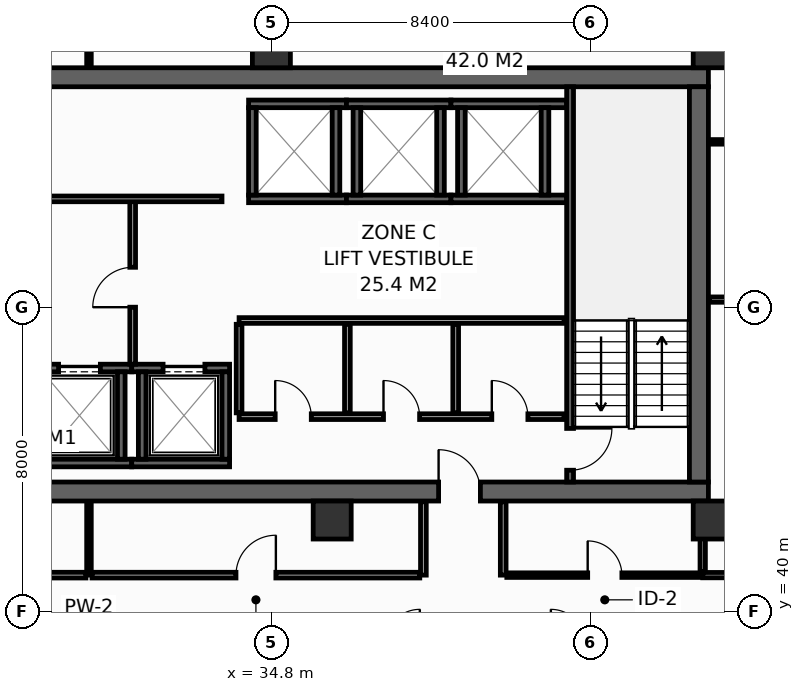
"""IFC4 building model, lengths in metres.
Left out: names, types, materials, properties, quantities, classifications, styles, units other than length and angle.
Written with IfcOpenShell. Run it as: python <this file> out.ifc"""

import sys

from ifc_helpers import new_model, si_unit, direction, frame, frame_2d, origin, origin_2d, place, context, subcontext, project, spatial, rectangle, hollow_rectangle, extrude, element, fill, save


model = new_model("IFC4")
c1 = context("Model", 3, precision=1e-05, world=origin(), true_north=direction((0.0, 1.0)))
c2 = subcontext(c1, "Body", "Model", "MODEL_VIEW")
j1 = project(units=[si_unit("LENGTHUNIT", "METRE"), si_unit("PLANEANGLEUNIT", "RADIAN")], contexts=[c1])
p1 = place(None, origin())
s1 = spatial("IfcSite", under=j1, at=p1, CompositionType="ELEMENT")
p2 = place(p1, origin())
s2 = spatial("IfcBuilding", under=s1, at=p2, CompositionType="ELEMENT")
p3 = place(p2, frame((0.0, 0.0, 144.8)))
s3 = spatial("IfcBuildingStorey", under=s2, at=p3, CompositionType="ELEMENT", Elevation=144.8)
p4 = place(p3, frame((13.6, 43.15, 0.0), z_axis=(0.0, 0.0, 1.0), x_axis=(1.0, 0.0, 0.0)))
e1 = element("IfcWall", 1, at=p4, inside=s3, PredefinedType="SHEAR", context=c2, shape_type="SweptSolid", body=[
    extrude(rectangle(XDim=32.7, YDim=0.5, at=frame_2d((16.35, 0.0))), origin(), (0.0, 0.0, 1.0), 3.55),
])
p5 = place(p4, frame((5.4, 0.0, 0.0)))
e2 = element("IfcOpeningElement", 2, at=p5, cuts=e1, PredefinedType="OPENING", context=c2, shape_type="SweptSolid", body=[
    extrude(rectangle(XDim=1.1, YDim=2.15, at=frame_2d((0.55, 1.075))), frame((0.0, 0.26, 0.0), z_axis=(0.0, -1.0, 0.0), x_axis=(1.0, 0.0, 0.0)), (0.0, 0.0, 1.0), 0.52),
])
p6 = place(p4, frame((25.6, 0.0, 0.0)))
e3 = element("IfcOpeningElement", 3, at=p6, cuts=e1, PredefinedType="OPENING", context=c2, shape_type="SweptSolid", body=[
    extrude(rectangle(XDim=1.1, YDim=2.15, at=frame_2d((0.55, 1.075))), frame((0.0, 0.26, 0.0), z_axis=(0.0, -1.0, 0.0), x_axis=(1.0, 0.0, 0.0)), (0.0, 0.0, 1.0), 0.52),
])
p7 = place(p3, frame((13.6, 54.05, 0.0), z_axis=(0.0, 0.0, 1.0), x_axis=(1.0, 0.0, 0.0)))
e4 = element("IfcWall", 4, at=p7, inside=s3, PredefinedType="SHEAR", context=c2, shape_type="SweptSolid", body=[
    extrude(rectangle(XDim=32.7, YDim=0.5, at=frame_2d((16.35, 0.0))), origin(), (0.0, 0.0, 1.0), 3.55),
])
p8 = place(p3, frame((46.05, 43.4, 0.0), z_axis=(0.0, 0.0, 1.0), x_axis=(0.0, 1.0, 0.0)))
e5 = element("IfcWall", 5, at=p8, inside=s3, PredefinedType="SHEAR", context=c2, shape_type="SweptSolid", body=[
    extrude(rectangle(XDim=10.4, YDim=0.5, at=frame_2d((5.2, 0.0))), origin(), (0.0, 0.0, 1.0), 3.55),
])
for number, where, z_axis, x_axis in (
    (6, (34.8, 54.8, 0.0), (0.0, 0.0, 1.0), (1.0, 0.0, 0.0)),
    (7, (46.4, 54.8, 0.0), (0.0, 0.0, 1.0), (1.0, 0.0, 0.0)),
    (8, (36.4, 42.4, 0.0), (0.0, 0.0, 1.0), (1.0, 0.0, 0.0)),
    (9, (46.4, 42.4, 0.0), (0.0, 0.0, 1.0), (1.0, 0.0, 0.0)),
):
    element("IfcColumn", number, at=place(p3, frame(where, z_axis=z_axis, x_axis=x_axis)), inside=s3, PredefinedType="COLUMN", context=c2, shape_type="SweptSolid", body=[
        extrude(hollow_rectangle(XDim=1.0, YDim=1.0, WallThickness=0.045, at=origin_2d()), origin(), (0.0, 0.0, 1.0), 3.8),
    ])
p9 = place(p3, frame((28.375, 43.9, 0.0), z_axis=(0.0, 0.0, 1.0), x_axis=(1.0, 0.0, 0.0)))
e10 = element("IfcWall", 10, at=p9, inside=s3, PredefinedType="SHEAR", context=c2, shape_type="SweptSolid", body=[
    extrude(rectangle(XDim=2.75, YDim=0.2, at=frame_2d((1.375, 0.0))), origin(), (0.0, 0.0, 1.0), 3.55),
])
p10 = place(p3, frame((28.375, 46.4, 0.0), z_axis=(0.0, 0.0, 1.0), x_axis=(1.0, 0.0, 0.0)))
e11 = element("IfcWall", 11, at=p10, inside=s3, PredefinedType="SHEAR", context=c2, shape_type="SweptSolid", body=[
    extrude(rectangle(XDim=2.75, YDim=0.2, at=frame_2d((1.375, 0.0))), origin(), (0.0, 0.0, 1.0), 3.55),
])
p11 = place(p10, frame((0.825, 0.0, 0.0)))
e12 = element("IfcOpeningElement", 12, at=p11, cuts=e11, PredefinedType="OPENING", context=c2, shape_type="SweptSolid", body=[
    extrude(rectangle(XDim=1.1, YDim=2.2, at=frame_2d((0.55, 1.1))), frame((0.0, 0.11, 0.0), z_axis=(0.0, -1.0, 0.0), x_axis=(1.0, 0.0, 0.0)), (0.0, 0.0, 1.0), 0.22),
])
p12 = place(p3, frame((30.85, 44.0, 0.0), z_axis=(0.0, 0.0, 1.0), x_axis=(0.0, 1.0, 0.0)))
e13 = element("IfcWall", 13, at=p12, inside=s3, PredefinedType="SHEAR", context=c2, shape_type="SweptSolid", body=[
    extrude(rectangle(XDim=2.3, YDim=0.2, at=frame_2d((1.15, 0.0))), origin(), (0.0, 0.0, 1.0), 3.55),
])
p13 = place(p3, frame((31.125, 43.9, 0.0), z_axis=(0.0, 0.0, 1.0), x_axis=(1.0, 0.0, 0.0)))
e14 = element("IfcWall", 14, at=p13, inside=s3, PredefinedType="SHEAR", context=c2, shape_type="SweptSolid", body=[
    extrude(rectangle(XDim=2.575, YDim=0.2, at=frame_2d((1.288, 0.0))), origin(), (0.0, 0.0, 1.0), 3.55),
])
p14 = place(p3, frame((31.125, 46.4, 0.0), z_axis=(0.0, 0.0, 1.0), x_axis=(1.0, 0.0, 0.0)))
e15 = element("IfcWall", 15, at=p14, inside=s3, PredefinedType="SHEAR", context=c2, shape_type="SweptSolid", body=[
    extrude(rectangle(XDim=2.575, YDim=0.2, at=frame_2d((1.288, 0.0))), origin(), (0.0, 0.0, 1.0), 3.55),
])
p15 = place(p14, frame((0.825, 0.0, 0.0)))
e16 = element("IfcOpeningElement", 16, at=p15, cuts=e15, PredefinedType="OPENING", context=c2, shape_type="SweptSolid", body=[
    extrude(rectangle(XDim=1.1, YDim=2.2, at=frame_2d((0.55, 1.1))), frame((0.0, 0.11, 0.0), z_axis=(0.0, -1.0, 0.0), x_axis=(1.0, 0.0, 0.0)), (0.0, 0.0, 1.0), 0.22),
])
for number, where, z_axis, x_axis in (
    (17, (31.4, 44.0, 0.0), (0.0, 0.0, 1.0), (0.0, 1.0, 0.0)),
    (18, (33.6, 44.0, 0.0), (0.0, 0.0, 1.0), (0.0, 1.0, 0.0)),
):
    element("IfcWall", number, at=place(p3, frame(where, z_axis=z_axis, x_axis=x_axis)), inside=s3, PredefinedType="SHEAR", context=c2, shape_type="SweptSolid", body=[
        extrude(rectangle(XDim=2.3, YDim=0.2, at=frame_2d((1.15, 0.0))), origin(), (0.0, 0.0, 1.0), 3.55),
    ])
for number, where, z_axis, x_axis in (
    (19, (34.2, 50.85, 0.0), (0.0, 0.0, 1.0), (1.0, 0.0, 0.0)),
    (20, (34.2, 53.35, 0.0), (0.0, 0.0, 1.0), (1.0, 0.0, 0.0)),
):
    element("IfcWall", number, at=place(p3, frame(where, z_axis=z_axis, x_axis=x_axis)), inside=s3, PredefinedType="SHEAR", context=c2, shape_type="SweptSolid", body=[
        extrude(rectangle(XDim=2.575, YDim=0.2, at=frame_2d((1.288, 0.0))), origin(), (0.0, 0.0, 1.0), 3.55),
    ])
for number, where, z_axis, x_axis in (
    (21, (34.3, 50.95, 0.0), (0.0, 0.0, 1.0), (0.0, 1.0, 0.0)),
    (22, (36.5, 50.95, 0.0), (0.0, 0.0, 1.0), (0.0, 1.0, 0.0)),
):
    element("IfcWall", number, at=place(p3, frame(where, z_axis=z_axis, x_axis=x_axis)), inside=s3, PredefinedType="SHEAR", context=c2, shape_type="SweptSolid", body=[
        extrude(rectangle(XDim=2.3, YDim=0.2, at=frame_2d((1.15, 0.0))), origin(), (0.0, 0.0, 1.0), 3.55),
    ])
for number, where, z_axis, x_axis in (
    (23, (36.775, 50.85, 0.0), (0.0, 0.0, 1.0), (1.0, 0.0, 0.0)),
    (24, (36.775, 53.35, 0.0), (0.0, 0.0, 1.0), (1.0, 0.0, 0.0)),
):
    element("IfcWall", number, at=place(p3, frame(where, z_axis=z_axis, x_axis=x_axis)), inside=s3, PredefinedType="SHEAR", context=c2, shape_type="SweptSolid", body=[
        extrude(rectangle(XDim=2.75, YDim=0.2, at=frame_2d((1.375, 0.0))), origin(), (0.0, 0.0, 1.0), 3.55),
    ])
for number, where, z_axis, x_axis in (
    (25, (37.05, 50.95, 0.0), (0.0, 0.0, 1.0), (0.0, 1.0, 0.0)),
    (26, (39.25, 50.95, 0.0), (0.0, 0.0, 1.0), (0.0, 1.0, 0.0)),
):
    element("IfcWall", number, at=place(p3, frame(where, z_axis=z_axis, x_axis=x_axis)), inside=s3, PredefinedType="SHEAR", context=c2, shape_type="SweptSolid", body=[
        extrude(rectangle(XDim=2.3, YDim=0.2, at=frame_2d((1.15, 0.0))), origin(), (0.0, 0.0, 1.0), 3.55),
    ])
for number, where, z_axis, x_axis in (
    (27, (39.525, 50.85, 0.0), (0.0, 0.0, 1.0), (1.0, 0.0, 0.0)),
    (28, (39.525, 53.35, 0.0), (0.0, 0.0, 1.0), (1.0, 0.0, 0.0)),
):
    element("IfcWall", number, at=place(p3, frame(where, z_axis=z_axis, x_axis=x_axis)), inside=s3, PredefinedType="SHEAR", context=c2, shape_type="SweptSolid", body=[
        extrude(rectangle(XDim=3.045, YDim=0.2, at=frame_2d((1.522, 0.0))), origin(), (0.0, 0.0, 1.0), 3.55),
    ])
for number, where, z_axis, x_axis in (
    (29, (39.8, 50.95, 0.0), (0.0, 0.0, 1.0), (0.0, 1.0, 0.0)),
    (30, (42.0, 50.95, 0.0), (0.0, 0.0, 1.0), (0.0, 1.0, 0.0)),
):
    element("IfcWall", number, at=place(p3, frame(where, z_axis=z_axis, x_axis=x_axis)), inside=s3, PredefinedType="SHEAR", context=c2, shape_type="SweptSolid", body=[
        extrude(rectangle(XDim=2.3, YDim=0.2, at=frame_2d((1.15, 0.0))), origin(), (0.0, 0.0, 1.0), 3.55),
    ])
p16 = place(p3, frame((42.66, 53.8, 0.0), z_axis=(0.0, 0.0, 1.0), x_axis=(0.0, -1.0, 0.0)))
e31 = element("IfcWall", 31, at=p16, inside=s3, PredefinedType="SHEAR", context=c2, shape_type="SweptSolid", body=[
    extrude(rectangle(XDim=10.4, YDim=0.18, at=frame_2d((5.2, 0.0))), origin(), (0.0, 0.0, 1.0), 3.55),
])
p17 = place(p16, frame((8.99, 0.0, 0.0)))
e32 = element("IfcOpeningElement", 32, at=p17, cuts=e31, PredefinedType="OPENING", context=c2, shape_type="SweptSolid", body=[
    extrude(rectangle(XDim=1.1, YDim=2.15, at=frame_2d((0.55, 1.075))), frame((0.0, 0.1, 0.0), z_axis=(0.0, -1.0, 0.0), x_axis=(1.0, 0.0, 0.0)), (0.0, 0.0, 1.0), 0.2),
])
p18 = place(p3, frame((31.15, 46.5, 0.0), z_axis=(0.0, 0.0, 1.0), x_axis=(0.0, 1.0, 0.0)))
e33 = element("IfcWall", 33, at=p18, inside=s3, PredefinedType="PARTITIONING", context=c2, shape_type="SweptSolid", body=[
    extrude(rectangle(XDim=4.35, YDim=0.15, at=frame_2d((2.175, 0.0))), origin(), (0.0, 0.0, 1.0), 3.55),
])
p19 = place(p18, frame((1.5, 0.0, 0.0)))
e34 = element("IfcOpeningElement", 34, at=p19, cuts=e33, PredefinedType="OPENING", context=c2, shape_type="SweptSolid", body=[
    extrude(rectangle(XDim=1.05, YDim=2.15, at=frame_2d((0.525, 1.075))), frame((0.0, 0.085, 0.0), z_axis=(0.0, -1.0, 0.0), x_axis=(1.0, 0.0, 0.0)), (0.0, 0.0, 1.0), 0.17),
])
p20 = place(p3, frame((33.95, 45.12, 0.0), z_axis=(0.0, 0.0, 1.0), x_axis=(1.0, 0.0, 0.0)))
e35 = element("IfcWall", 35, at=p20, inside=s3, PredefinedType="PARTITIONING", context=c2, shape_type="SweptSolid", body=[
    extrude(rectangle(XDim=8.55, YDim=0.15, at=frame_2d((4.275, 0.0))), origin(), (0.0, 0.0, 1.0), 3.55),
])
p21 = place(p20, frame((0.95, 0.0, 0.0)))
e36 = element("IfcOpeningElement", 36, at=p21, cuts=e35, PredefinedType="OPENING", context=c2, shape_type="SweptSolid", body=[
    extrude(rectangle(XDim=0.95, YDim=2.15, at=frame_2d((0.475, 1.075))), frame((0.0, 0.085, 0.0), z_axis=(0.0, -1.0, 0.0), x_axis=(1.0, 0.0, 0.0)), (0.0, 0.0, 1.0), 0.17),
])
p22 = place(p20, frame((3.8, 0.0, 0.0)))
e37 = element("IfcOpeningElement", 37, at=p22, cuts=e35, PredefinedType="OPENING", context=c2, shape_type="SweptSolid", body=[
    extrude(rectangle(XDim=0.95, YDim=2.15, at=frame_2d((0.475, 1.075))), frame((0.0, 0.085, 0.0), z_axis=(0.0, -1.0, 0.0), x_axis=(1.0, 0.0, 0.0)), (0.0, 0.0, 1.0), 0.17),
])
p23 = place(p20, frame((6.65, 0.0, 0.0)))
e38 = element("IfcOpeningElement", 38, at=p23, cuts=e35, PredefinedType="OPENING", context=c2, shape_type="SweptSolid", body=[
    extrude(rectangle(XDim=0.95, YDim=2.15, at=frame_2d((0.475, 1.075))), frame((0.0, 0.085, 0.0), z_axis=(0.0, -1.0, 0.0), x_axis=(1.0, 0.0, 0.0)), (0.0, 0.0, 1.0), 0.17),
])
p24 = place(p3, frame((33.95, 47.65, 0.0), z_axis=(0.0, 0.0, 1.0), x_axis=(1.0, 0.0, 0.0)))
e39 = element("IfcWall", 39, at=p24, inside=s3, PredefinedType="PARTITIONING", context=c2, shape_type="SweptSolid", body=[
    extrude(rectangle(XDim=8.55, YDim=0.15, at=frame_2d((4.275, 0.0))), origin(), (0.0, 0.0, 1.0), 3.55),
])
for number, where, z_axis, x_axis in (
    (40, (33.95, 45.22, 0.0), (0.0, 0.0, 1.0), (0.0, 1.0, 0.0)),
    (41, (36.8, 45.22, 0.0), (0.0, 0.0, 1.0), (0.0, 1.0, 0.0)),
    (42, (39.65, 45.22, 0.0), (0.0, 0.0, 1.0), (0.0, 1.0, 0.0)),
):
    element("IfcWall", number, at=place(p3, frame(where, z_axis=z_axis, x_axis=x_axis)), inside=s3, PredefinedType="PARTITIONING", context=c2, shape_type="SweptSolid", body=[
        extrude(rectangle(XDim=2.33, YDim=0.15, at=frame_2d((1.165, 0.0))), origin(), (0.0, 0.0, 1.0), 3.55),
    ])
p25 = place(p3, frame((25.85, 50.85, 0.0), z_axis=(0.0, 0.0, 1.0), x_axis=(1.0, 0.0, 0.0)))
e43 = element("IfcWall", 43, at=p25, inside=s3, PredefinedType="PARTITIONING", context=c2, shape_type="SweptSolid", body=[
    extrude(rectangle(XDim=7.65, YDim=0.15, at=frame_2d((3.825, 0.0))), origin(), (0.0, 0.0, 1.0), 3.55),
])
p26 = place(p25, frame((1.25, 0.0, 0.0)))
e44 = element("IfcOpeningElement", 44, at=p26, cuts=e43, PredefinedType="OPENING", context=c2, shape_type="SweptSolid", body=[
    extrude(rectangle(XDim=0.95, YDim=2.15, at=frame_2d((0.475, 1.075))), frame((0.0, 0.085, 0.0), z_axis=(0.0, -1.0, 0.0), x_axis=(1.0, 0.0, 0.0)), (0.0, 0.0, 1.0), 0.17),
])
p27 = place(p3, frame((46.15, 40.95, 0.0), z_axis=(0.0, 0.0, 1.0), x_axis=(1.0, 0.0, 0.0)))
e45 = element("IfcWall", 45, at=p27, inside=s3, PredefinedType="PARTITIONING", context=c2, shape_type="SweptSolid", body=[
    extrude(rectangle(XDim=4.05, YDim=0.14, at=frame_2d((2.025, 0.0))), origin(), (0.0, 0.0, 1.0), 3.55),
])
p28 = place(p3, frame((46.15, 41.04, 0.0), z_axis=(0.0, 0.0, 1.0), x_axis=(0.0, 1.0, 0.0)))
e46 = element("IfcWall", 46, at=p28, inside=s3, PredefinedType="PARTITIONING", context=c2, shape_type="SweptSolid", body=[
    extrude(rectangle(XDim=1.84, YDim=0.14, at=frame_2d((0.92, 0.0))), origin(), (0.0, 0.0, 1.0), 3.55),
])
p29 = place(p3, frame((46.32, 48.2, 0.0), z_axis=(0.0, 0.0, 1.0), x_axis=(1.0, 0.0, 0.0)))
e47 = element("IfcWall", 47, at=p29, inside=s3, PredefinedType="PARTITIONING", context=c2, shape_type="SweptSolid", body=[
    extrude(rectangle(XDim=3.88, YDim=0.14, at=frame_2d((1.94, 0.0))), origin(), (0.0, 0.0, 1.0), 3.55),
])
p30 = place(p3, frame((46.32, 52.35, 0.0), z_axis=(0.0, 0.0, 1.0), x_axis=(1.0, 0.0, 0.0)))
e48 = element("IfcWall", 48, at=p30, inside=s3, PredefinedType="PARTITIONING", context=c2, shape_type="SweptSolid", body=[
    extrude(rectangle(XDim=3.88, YDim=0.12, at=frame_2d((1.94, 0.0))), origin(), (0.0, 0.0, 1.0), 3.55),
])
p31 = place(p3, frame((30.0, 54.32, 0.0), z_axis=(0.0, 0.0, 1.0), x_axis=(0.0, 1.0, 0.0)))
e49 = element("IfcWall", 49, at=p31, inside=s3, PredefinedType="PARTITIONING", context=c2, shape_type="SweptSolid", body=[
    extrude(rectangle(XDim=1.675, YDim=0.12, at=frame_2d((0.837, 0.0))), origin(), (0.0, 0.0, 1.0), 2.935),
])
for number, where, z_axis, x_axis in (
    (50, (38.8, 40.95, 0.0), (0.0, 0.0, 1.0), (0.0, 1.0, 0.0)),
    (51, (40.9, 40.95, 0.0), (0.0, 0.0, 1.0), (0.0, 1.0, 0.0)),
):
    element("IfcWall", number, at=place(p3, frame(where, z_axis=z_axis, x_axis=x_axis)), inside=s3, PredefinedType="PARTITIONING", context=c2, shape_type="SweptSolid", body=[
        extrude(rectangle(XDim=1.93, YDim=0.15, at=frame_2d((0.965, 0.0))), origin(), (0.0, 0.0, 1.0), 3.55),
    ])
p32 = place(p3, frame((30.0, 40.95, 0.0), z_axis=(0.0, 0.0, 1.0), x_axis=(0.0, 1.0, 0.0)))
e52 = element("IfcWall", 52, at=p32, inside=s3, PredefinedType="PARTITIONING", context=c2, shape_type="SweptSolid", body=[
    extrude(rectangle(XDim=1.93, YDim=0.12, at=frame_2d((0.965, 0.0))), origin(), (0.0, 0.0, 1.0), 2.835),
])
p33 = place(p3, frame((20.795, 40.95, 0.0), z_axis=(0.0, 0.0, 1.0), x_axis=(1.0, 0.0, 0.0)))
e53 = element("IfcWall", 53, at=p33, inside=s3, PredefinedType="PARTITIONING", context=c2, shape_type="SweptSolid", body=[
    extrude(rectangle(XDim=9.125, YDim=0.15, at=frame_2d((4.562, 0.0))), origin(), (0.0, 0.0, 1.0), 2.835),
])
p34 = place(p33, frame((4.062, 0.0, 0.0)))
e54 = element("IfcOpeningElement", 54, at=p34, cuts=e53, PredefinedType="OPENING", context=c2, shape_type="SweptSolid", body=[
    extrude(rectangle(XDim=1.0, YDim=2.15, at=frame_2d((0.5, 1.075))), frame((0.0, 0.085, 0.0), z_axis=(0.0, -1.0, 0.0), x_axis=(1.0, 0.0, 0.0)), (0.0, 0.0, 1.0), 0.17),
])
p35 = place(p3, frame((30.08, 40.95, 0.0), z_axis=(0.0, 0.0, 1.0), x_axis=(1.0, 0.0, 0.0)))
e55 = element("IfcWall", 55, at=p35, inside=s3, PredefinedType="PARTITIONING", context=c2, shape_type="SweptSolid", body=[
    extrude(rectangle(XDim=8.625, YDim=0.15, at=frame_2d((4.312, 0.0))), origin(), (0.0, 0.0, 1.0), 2.835),
])
p36 = place(p35, frame((3.788, 0.0, 0.0)))
e56 = element("IfcOpeningElement", 56, at=p36, cuts=e55, PredefinedType="OPENING", context=c2, shape_type="SweptSolid", body=[
    extrude(rectangle(XDim=1.05, YDim=2.15, at=frame_2d((0.525, 1.075))), frame((0.0, 0.085, 0.0), z_axis=(0.0, -1.0, 0.0), x_axis=(1.0, 0.0, 0.0)), (0.0, 0.0, 1.0), 0.17),
])
p37 = place(p3, frame((40.995, 40.95, 0.0), z_axis=(0.0, 0.0, 1.0), x_axis=(1.0, 0.0, 0.0)))
e57 = element("IfcWall", 57, at=p37, inside=s3, PredefinedType="PARTITIONING", context=c2, shape_type="SweptSolid", body=[
    extrude(rectangle(XDim=5.155, YDim=0.12, at=frame_2d((2.577, 0.0))), origin(), (0.0, 0.0, 1.0), 3.55),
])
p38 = place(p37, frame((2.128, 0.0, 0.0)))
e58 = element("IfcOpeningElement", 58, at=p38, cuts=e57, PredefinedType="OPENING", context=c2, shape_type="SweptSolid", body=[
    extrude(rectangle(XDim=0.9, YDim=2.1, at=frame_2d((0.45, 1.05))), frame((0.0, 0.07, 0.0), z_axis=(0.0, -1.0, 0.0), x_axis=(1.0, 0.0, 0.0)), (0.0, 0.0, 1.0), 0.14),
])
p39 = place(p11, origin())
e59 = element("IfcDoor", 59, at=p39, inside=s3, OperationType="SLIDING_TO_LEFT", PredefinedType="DOOR", context=c2, shape_type="SweptSolid", body=[
    extrude(rectangle(XDim=1.1, YDim=2.2, at=frame_2d((0.55, 1.1))), frame((0.0, 0.025, 0.0), z_axis=(0.0, -1.0, 0.0), x_axis=(1.0, 0.0, 0.0)), (0.0, 0.0, 1.0), 0.05),
])
fill(e12, e59)
p40 = place(p15, origin())
e60 = element("IfcDoor", 60, at=p40, inside=s3, OperationType="SLIDING_TO_LEFT", PredefinedType="DOOR", context=c2, shape_type="SweptSolid", body=[
    extrude(rectangle(XDim=1.1, YDim=2.2, at=frame_2d((0.55, 1.1))), frame((0.0, 0.025, 0.0), z_axis=(0.0, -1.0, 0.0), x_axis=(1.0, 0.0, 0.0)), (0.0, 0.0, 1.0), 0.05),
])
fill(e16, e60)
p41 = place(p17, origin())
e61 = element("IfcDoor", 61, at=p41, inside=s3, OperationType="SINGLE_SWING_LEFT", PredefinedType="DOOR", context=c2, shape_type="SweptSolid", body=[
    extrude(rectangle(XDim=1.1, YDim=2.15, at=frame_2d((0.55, 1.075))), frame((0.0, 0.025, 0.0), z_axis=(0.0, -1.0, 0.0), x_axis=(1.0, 0.0, 0.0)), (0.0, 0.0, 1.0), 0.05),
])
fill(e32, e61)
p42 = place(p6, origin())
e62 = element("IfcDoor", 62, at=p42, inside=s3, OperationType="SINGLE_SWING_LEFT", PredefinedType="DOOR", context=c2, shape_type="SweptSolid", body=[
    extrude(rectangle(XDim=1.1, YDim=2.15, at=frame_2d((0.55, 1.075))), frame((0.0, 0.025, 0.0), z_axis=(0.0, -1.0, 0.0), x_axis=(1.0, 0.0, 0.0)), (0.0, 0.0, 1.0), 0.05),
])
fill(e3, e62)
p43 = place(p19, origin())
e63 = element("IfcDoor", 63, at=p43, inside=s3, OperationType="SINGLE_SWING_LEFT", PredefinedType="DOOR", context=c2, shape_type="SweptSolid", body=[
    extrude(rectangle(XDim=1.05, YDim=2.15, at=frame_2d((0.525, 1.075))), frame((0.0, 0.025, 0.0), z_axis=(0.0, -1.0, 0.0), x_axis=(1.0, 0.0, 0.0)), (0.0, 0.0, 1.0), 0.05),
])
fill(e34, e63)
p44 = place(p21, origin())
e64 = element("IfcDoor", 64, at=p44, inside=s3, OperationType="SINGLE_SWING_LEFT", PredefinedType="DOOR", context=c2, shape_type="SweptSolid", body=[
    extrude(rectangle(XDim=0.95, YDim=2.15, at=frame_2d((0.475, 1.075))), frame((0.0, 0.025, 0.0), z_axis=(0.0, -1.0, 0.0), x_axis=(1.0, 0.0, 0.0)), (0.0, 0.0, 1.0), 0.05),
])
fill(e36, e64)
p45 = place(p22, origin())
e65 = element("IfcDoor", 65, at=p45, inside=s3, OperationType="SINGLE_SWING_LEFT", PredefinedType="DOOR", context=c2, shape_type="SweptSolid", body=[
    extrude(rectangle(XDim=0.95, YDim=2.15, at=frame_2d((0.475, 1.075))), frame((0.0, 0.025, 0.0), z_axis=(0.0, -1.0, 0.0), x_axis=(1.0, 0.0, 0.0)), (0.0, 0.0, 1.0), 0.05),
])
fill(e37, e65)
p46 = place(p23, origin())
e66 = element("IfcDoor", 66, at=p46, inside=s3, OperationType="SINGLE_SWING_LEFT", PredefinedType="DOOR", context=c2, shape_type="SweptSolid", body=[
    extrude(rectangle(XDim=0.95, YDim=2.15, at=frame_2d((0.475, 1.075))), frame((0.0, 0.025, 0.0), z_axis=(0.0, -1.0, 0.0), x_axis=(1.0, 0.0, 0.0)), (0.0, 0.0, 1.0), 0.05),
])
fill(e38, e66)
p47 = place(p36, origin())
e67 = element("IfcDoor", 67, at=p47, inside=s3, OperationType="SINGLE_SWING_RIGHT", PredefinedType="DOOR", context=c2, shape_type="SweptSolid", body=[
    extrude(rectangle(XDim=1.05, YDim=2.15, at=frame_2d((0.525, 1.075))), frame((0.0, 0.025, 0.0), z_axis=(0.0, -1.0, 0.0), x_axis=(1.0, 0.0, 0.0)), (0.0, 0.0, 1.0), 0.05),
])
fill(e56, e67)
p48 = place(p38, origin())
e68 = element("IfcDoor", 68, at=p48, inside=s3, OperationType="SINGLE_SWING_LEFT", PredefinedType="DOOR", context=c2, shape_type="SweptSolid", body=[
    extrude(rectangle(XDim=0.9, YDim=2.1, at=frame_2d((0.45, 1.05))), frame((0.0, 0.025, 0.0), z_axis=(0.0, -1.0, 0.0), x_axis=(1.0, 0.0, 0.0)), (0.0, 0.0, 1.0), 0.05),
])
fill(e58, e68)
save(model, sys.argv[1])
